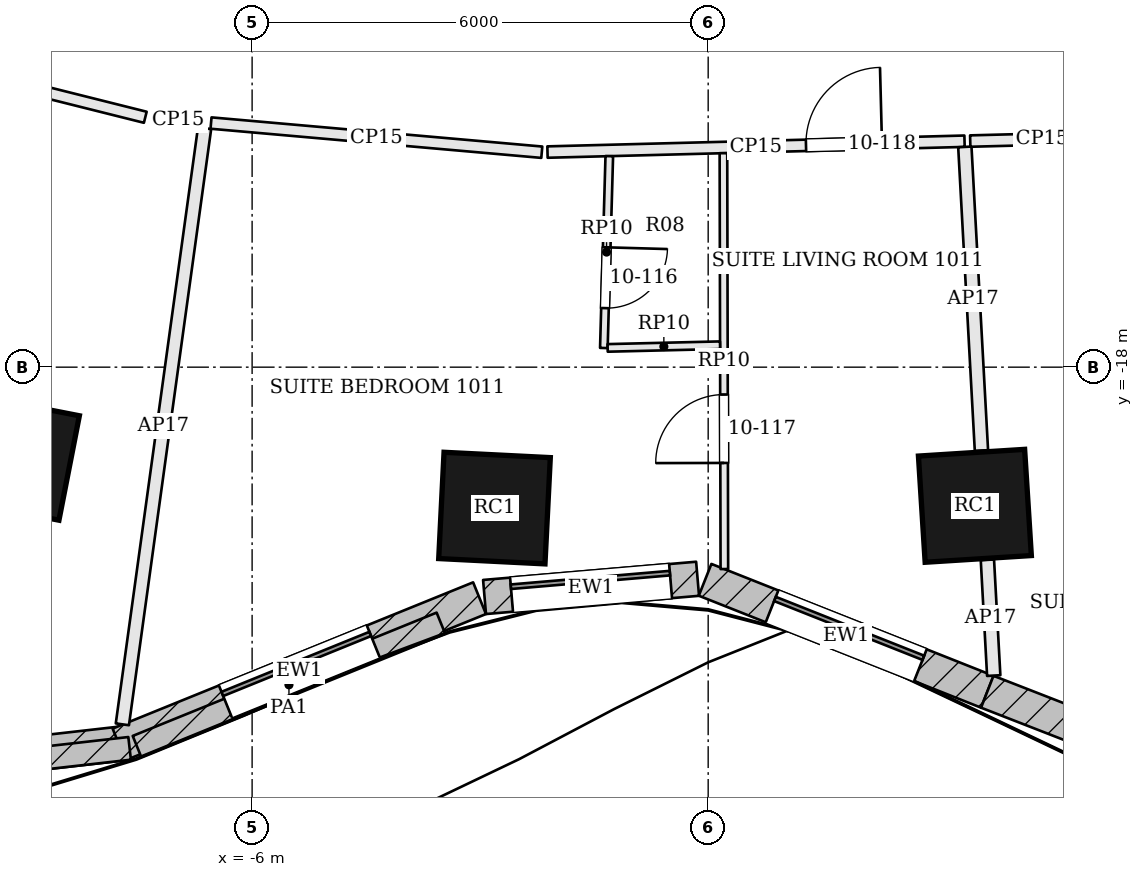
"""IFC4 building model, lengths in metres.
Left out: names, types, materials, properties, quantities, classifications, styles, units other than length and angle.
Written with IfcOpenShell. Run it as: python <this file> out.ifc"""

import sys

from ifc_helpers import new_model, si_unit, direction, frame, frame_2d, origin, origin_2d, place, context, subcontext, project, spatial, rectangle, extrude, element, fill, save


model = new_model("IFC4")
c1 = context("Model", 3, precision=1e-05, world=origin(), true_north=direction((0.0, 1.0)))
c2 = subcontext(c1, "Body", "Model", "MODEL_VIEW")
j1 = project(units=[si_unit("LENGTHUNIT", "METRE"), si_unit("PLANEANGLEUNIT", "RADIAN")], contexts=[c1])
p1 = place(None, origin())
s1 = spatial("IfcSite", under=j1, at=p1, CompositionType="ELEMENT")
p2 = place(p1, origin())
s2 = spatial("IfcBuilding", under=s1, at=p2, CompositionType="ELEMENT")
p3 = place(p2, frame((0.0, 0.0, 51.9)))
s3 = spatial("IfcBuildingStorey", under=s2, at=p3, CompositionType="ELEMENT", Elevation=51.9)
for number, where, z_axis, x_axis in (
    (1, (-9.094, -19.192, 0.0), (0.0, 0.0, 1.0), (0.981, -0.192, 0.0)),
    (2, (-2.811, -19.854, 0.0), (0.0, 0.0, 1.0), (0.999, -0.05, 0.0)),
    (3, (3.509, -19.824, 0.0), (0.0, 0.0, 1.0), (0.998, 0.063, 0.0)),
):
    element("IfcColumn", number, at=place(p3, frame(where, z_axis=z_axis, x_axis=x_axis)), inside=s3, PredefinedType="COLUMN", context=c2, shape_type="SweptSolid", body=[
        extrude(rectangle(XDim=1.4, YDim=1.4, at=origin_2d()), origin(), (0.0, 0.0, 1.0), 3.6),
    ])
p4 = place(p3, frame((-12.086, -23.448, 0.0), z_axis=(0.0, 0.0, 1.0), x_axis=(0.993615664665, 0.112818043472, 0.0)))
e4 = element("IfcWall", 4, at=p4, inside=s3, PredefinedType="SOLIDWALL", context=c2, shape_type="SweptSolid", body=[
    extrude(rectangle(XDim=4.423, YDim=0.45, at=frame_2d((2.212, 0.0))), origin(), (0.0, 0.0, 1.0), 3.4),
])
p5 = place(p4, frame((1.162, 0.0, 0.9)))
e5 = element("IfcOpeningElement", 5, at=p5, cuts=e4, PredefinedType="OPENING", context=c2, shape_type="SweptSolid", body=[
    extrude(rectangle(XDim=2.1, YDim=2.0, at=frame_2d((1.05, 1.0))), frame((0.0, 0.235, 0.0), z_axis=(0.0, -1.0, 0.0), x_axis=(1.0, 0.0, 0.0)), (0.0, 0.0, 1.0), 0.47),
])
p6 = place(p3, frame((-7.75, -22.964, 0.0), z_axis=(0.0, 0.0, 1.0), x_axis=(0.926629703254, 0.375975255897, 0.0)))
e6 = element("IfcWall", 6, at=p6, inside=s3, PredefinedType="SOLIDWALL", context=c2, shape_type="SweptSolid", body=[
    extrude(rectangle(XDim=5.118, YDim=0.45, at=frame_2d((2.559, 0.0))), origin(), (0.0, 0.0, 1.0), 3.4),
])
p7 = place(p6, frame((1.509, 0.0, 0.9)))
e7 = element("IfcOpeningElement", 7, at=p7, cuts=e6, PredefinedType="OPENING", context=c2, shape_type="SweptSolid", body=[
    extrude(rectangle(XDim=2.1, YDim=2.0, at=frame_2d((1.05, 1.0))), frame((0.0, 0.235, 0.0), z_axis=(0.0, -1.0, 0.0), x_axis=(1.0, 0.0, 0.0)), (0.0, 0.0, 1.0), 0.47),
])
p8 = place(p3, frame((-2.942, -21.024, 0.0), z_axis=(0.0, 0.0, 1.0), x_axis=(0.996362034459, 0.085221454389, 0.0)))
e8 = element("IfcWall", 8, at=p8, inside=s3, PredefinedType="SOLIDWALL", context=c2, shape_type="SweptSolid", body=[
    extrude(rectangle(XDim=2.813, YDim=0.45, at=frame_2d((1.407, 0.0))), origin(), (0.0, 0.0, 1.0), 3.4),
])
p9 = place(p8, frame((0.357, 0.0, 0.9)))
e9 = element("IfcOpeningElement", 9, at=p9, cuts=e8, PredefinedType="OPENING", context=c2, shape_type="SweptSolid", body=[
    extrude(rectangle(XDim=2.1, YDim=2.0, at=frame_2d((1.05, 1.0))), frame((0.0, 0.235, 0.0), z_axis=(0.0, -1.0, 0.0), x_axis=(1.0, 0.0, 0.0)), (0.0, 0.0, 1.0), 0.47),
])
p10 = place(p3, frame((-0.041, -20.798, 0.0), z_axis=(0.0, 0.0, 1.0), x_axis=(0.929539262027, -0.368723148649, 0.0)))
e10 = element("IfcWall", 10, at=p10, inside=s3, PredefinedType="SOLIDWALL", context=c2, shape_type="SweptSolid", body=[
    extrude(rectangle(XDim=3.995, YDim=0.45, at=frame_2d((1.997, 0.0))), origin(), (0.0, 0.0, 1.0), 3.4),
])
p11 = place(p10, frame((0.947, 0.0, 0.9)))
e11 = element("IfcOpeningElement", 11, at=p11, cuts=e10, PredefinedType="OPENING", context=c2, shape_type="SweptSolid", body=[
    extrude(rectangle(XDim=2.1, YDim=2.0, at=frame_2d((1.05, 1.0))), frame((0.0, 0.235, 0.0), z_axis=(0.0, -1.0, 0.0), x_axis=(1.0, 0.0, 0.0)), (0.0, 0.0, 1.0), 0.47),
])
p12 = place(p3, frame((3.672, -22.27, 0.0), z_axis=(0.0, 0.0, 1.0), x_axis=(0.931791503167, -0.36299393194, 0.0)))
e12 = element("IfcWall", 12, at=p12, inside=s3, PredefinedType="SOLIDWALL", context=c2, shape_type="SweptSolid", body=[
    extrude(rectangle(XDim=4.56, YDim=0.45, at=frame_2d((2.28, 0.0))), origin(), (0.0, 0.0, 1.0), 3.4),
])
p13 = place(p12, frame((1.23, 0.0, 0.9)))
e13 = element("IfcOpeningElement", 13, at=p13, cuts=e12, PredefinedType="OPENING", context=c2, shape_type="SweptSolid", body=[
    extrude(rectangle(XDim=2.1, YDim=2.0, at=frame_2d((1.05, 1.0))), frame((0.0, 0.235, 0.0), z_axis=(0.0, -1.0, 0.0), x_axis=(1.0, 0.0, 0.0)), (0.0, 0.0, 1.0), 0.47),
])
p14 = place(p3, frame((-11.945, -23.507, 3.6), z_axis=(0.0, 0.0, 1.0), x_axis=(0.993618806168, 0.11279037206, 0.0)))
e14 = element("IfcWall", 14, at=p14, inside=s3, PredefinedType="PARAPET", context=c2, shape_type="SweptSolid", body=[
    extrude(rectangle(XDim=4.362, YDim=0.3, at=frame_2d((2.181, 0.0))), origin(), (0.0, 0.0, 1.0), 1.1),
])
p15 = place(p3, frame((-7.514, -22.99, 3.6), z_axis=(0.0, 0.0, 1.0), x_axis=(0.926627413994, 0.375980897966, 0.0)))
e15 = element("IfcWall", 15, at=p15, inside=s3, PredefinedType="PARAPET", context=c2, shape_type="SweptSolid", body=[
    extrude(rectangle(XDim=4.315, YDim=0.3, at=frame_2d((2.157, 0.0))), origin(), (0.0, 0.0, 1.0), 1.1),
])
p16 = place(p3, frame((-12.371, -13.468, 0.0), z_axis=(0.0, 0.0, 1.0), x_axis=(0.969987994087, -0.243152814764, 0.0)))
e16 = element("IfcWall", 16, at=p16, inside=s3, PredefinedType="PARTITIONING", context=c2, shape_type="SweptSolid", body=[
    extrude(rectangle(XDim=5.119, YDim=0.15, at=frame_2d((2.559, 0.0))), origin(), (0.0, 0.0, 1.0), 2.68),
])
p17 = place(p16, frame((1.067, 0.0, 0.0)))
e17 = element("IfcOpeningElement", 17, at=p17, cuts=e16, PredefinedType="OPENING", context=c2, shape_type="SweptSolid", body=[
    extrude(rectangle(XDim=1.0, YDim=2.1, at=frame_2d((0.5, 1.05))), frame((0.0, 0.085, 0.0), z_axis=(0.0, -1.0, 0.0), x_axis=(1.0, 0.0, 0.0)), (0.0, 0.0, 1.0), 0.17),
])
p18 = place(p3, frame((-7.331, -14.719, 0.0), z_axis=(0.0, 0.0, 1.0), x_axis=(0.996148207285, -0.087685512617, 0.0)))
e18 = element("IfcWall", 18, at=p18, inside=s3, PredefinedType="PARTITIONING", context=c2, shape_type="SweptSolid", body=[
    extrude(rectangle(XDim=0.718, YDim=0.15, at=frame_2d((0.359, 0.0))), origin(), (0.0, 0.0, 1.0), 2.68),
])
p19 = place(p3, frame((-7.707, -22.699, 0.0), z_axis=(0.0, 0.0, 1.0), x_axis=(0.13661443917, 0.990624295589, 0.0)))
e19 = element("IfcWall", 19, at=p19, inside=s3, PredefinedType="PARTITIONING", context=c2, shape_type="SweptSolid", body=[
    extrude(rectangle(XDim=7.917, YDim=0.175, at=frame_2d((3.958, 0.0))), origin(), (0.0, 0.0, 1.0), 2.68),
])
p20 = place(p3, frame((-6.541, -14.789, 0.0), z_axis=(0.0, 0.0, 1.0), x_axis=(0.996138192674, -0.087799208971, 0.0)))
e20 = element("IfcWall", 20, at=p20, inside=s3, PredefinedType="PARTITIONING", context=c2, shape_type="SweptSolid", body=[
    extrude(rectangle(XDim=4.368, YDim=0.15, at=frame_2d((2.184, 0.0))), origin(), (0.0, 0.0, 1.0), 2.68),
])
p21 = place(p3, frame((-2.114, -15.17, 0.0), z_axis=(0.0, 0.0, 1.0), x_axis=(0.999662545619, 0.025976814392, 0.0)))
e21 = element("IfcWall", 21, at=p21, inside=s3, PredefinedType="PARTITIONING", context=c2, shape_type="SweptSolid", body=[
    extrude(rectangle(XDim=5.489, YDim=0.15, at=frame_2d((2.744, 0.0))), origin(), (0.0, 0.0, 1.0), 2.68),
])
p22 = place(p21, frame((3.402, 0.0, 0.0)))
e22 = element("IfcOpeningElement", 22, at=p22, cuts=e21, PredefinedType="OPENING", context=c2, shape_type="SweptSolid", body=[
    extrude(rectangle(XDim=1.0, YDim=2.1, at=frame_2d((0.5, 1.05))), frame((0.0, 0.085, 0.0), z_axis=(0.0, -1.0, 0.0), x_axis=(1.0, 0.0, 0.0)), (0.0, 0.0, 1.0), 0.17),
])
p23 = place(p3, frame((3.757, -22.058, 0.0), z_axis=(0.0, 0.0, 1.0), x_axis=(-0.054592188309, 0.998508734552, 0.0)))
e23 = element("IfcWall", 23, at=p23, inside=s3, PredefinedType="PARTITIONING", context=c2, shape_type="SweptSolid", body=[
    extrude(rectangle(XDim=1.525, YDim=0.175, at=frame_2d((0.762, 0.0))), origin(), (0.0, 0.0, 1.0), 2.68),
])
p24 = place(p3, frame((3.595, -19.097, 0.0), z_axis=(0.0, 0.0, 1.0), x_axis=(-0.054614936385, 0.99850749057, 0.0)))
e24 = element("IfcWall", 24, at=p24, inside=s3, PredefinedType="PARTITIONING", context=c2, shape_type="SweptSolid", body=[
    extrude(rectangle(XDim=4.001, YDim=0.175, at=frame_2d((2.0, 0.0))), origin(), (0.0, 0.0, 1.0), 2.68),
])
p25 = place(p3, frame((3.448, -15.025, 0.0), z_axis=(0.0, 0.0, 1.0), x_axis=(0.999663410965, 0.025943492008, 0.0)))
e25 = element("IfcWall", 25, at=p25, inside=s3, PredefinedType="PARTITIONING", context=c2, shape_type="SweptSolid", body=[
    extrude(rectangle(XDim=1.892, YDim=0.15, at=frame_2d((0.946, 0.0))), origin(), (0.0, 0.0, 1.0), 2.68),
])
p26 = place(p3, frame((0.213, -20.656, 0.0), z_axis=(0.0, 0.0, 1.0), x_axis=(-0.00223124082, 0.999997510779, 0.0)))
e26 = element("IfcWall", 26, at=p26, inside=s3, PredefinedType="PARTITIONING", context=c2, shape_type="SweptSolid", body=[
    extrude(rectangle(XDim=5.471, YDim=0.1, at=frame_2d((2.735, 0.0))), origin(), (0.0, 0.0, 1.0), 2.898),
])
p27 = place(p26, frame((1.396, 0.0, 0.0)))
e27 = element("IfcOpeningElement", 27, at=p27, cuts=e26, PredefinedType="OPENING", context=c2, shape_type="SweptSolid", body=[
    extrude(rectangle(XDim=0.9, YDim=2.4, at=frame_2d((0.45, 1.2))), frame((0.0, 0.06, 0.0), z_axis=(0.0, -1.0, 0.0), x_axis=(1.0, 0.0, 0.0)), (0.0, 0.0, 1.0), 0.12),
])
p28 = place(p3, frame((-1.301, -15.224, 0.0), z_axis=(0.0, 0.0, 1.0), x_axis=(-0.028333401265, -0.999598528597, 0.0)))
e28 = element("IfcWall", 28, at=p28, inside=s3, PredefinedType="PARTITIONING", context=c2, shape_type="SweptSolid", body=[
    extrude(rectangle(XDim=2.525, YDim=0.1, at=frame_2d((1.262, 0.0))), origin(), (0.0, 0.0, 1.0), 2.898),
])
p29 = place(p28, frame((1.2, 0.0, 0.0)))
e29 = element("IfcOpeningElement", 29, at=p29, cuts=e28, PredefinedType="OPENING", context=c2, shape_type="SweptSolid", body=[
    extrude(rectangle(XDim=0.8, YDim=2.1, at=frame_2d((0.4, 1.05))), frame((0.0, 0.06, 0.0), z_axis=(0.0, -1.0, 0.0), x_axis=(1.0, 0.0, 0.0)), (0.0, 0.0, 1.0), 0.12),
])
p30 = place(p3, frame((-1.323, -17.747, 0.0), z_axis=(0.0, 0.0, 1.0), x_axis=(0.999713673915, 0.023928438877, 0.0)))
e30 = element("IfcWall", 30, at=p30, inside=s3, PredefinedType="PARTITIONING", context=c2, shape_type="SweptSolid", body=[
    extrude(rectangle(XDim=1.479, YDim=0.1, at=frame_2d((0.74, 0.0))), origin(), (0.0, 0.0, 1.0), 2.898),
])
p31 = place(p7, origin())
e31 = element("IfcWindow", 31, at=p31, inside=s3, PartitioningType="SINGLE_PANEL", PredefinedType="WINDOW", context=c2, shape_type="SweptSolid", body=[
    extrude(rectangle(XDim=2.1, YDim=2.0, at=frame_2d((1.05, 1.0))), frame((0.0, 0.135, 0.0), z_axis=(0.0, -1.0, 0.0), x_axis=(1.0, 0.0, 0.0)), (0.0, 0.0, 1.0), 0.06),
])
fill(e7, e31)
p32 = place(p9, origin())
e32 = element("IfcWindow", 32, at=p32, inside=s3, PartitioningType="SINGLE_PANEL", PredefinedType="WINDOW", context=c2, shape_type="SweptSolid", body=[
    extrude(rectangle(XDim=2.1, YDim=2.0, at=frame_2d((1.05, 1.0))), frame((0.0, 0.135, 0.0), z_axis=(0.0, -1.0, 0.0), x_axis=(1.0, 0.0, 0.0)), (0.0, 0.0, 1.0), 0.06),
])
fill(e9, e32)
p33 = place(p11, origin())
e33 = element("IfcWindow", 33, at=p33, inside=s3, PartitioningType="SINGLE_PANEL", PredefinedType="WINDOW", context=c2, shape_type="SweptSolid", body=[
    extrude(rectangle(XDim=2.1, YDim=2.0, at=frame_2d((1.05, 1.0))), frame((0.0, 0.135, 0.0), z_axis=(0.0, -1.0, 0.0), x_axis=(1.0, 0.0, 0.0)), (0.0, 0.0, 1.0), 0.06),
])
fill(e11, e33)
p34 = place(p29, origin())
e34 = element("IfcDoor", 34, at=p34, inside=s3, OperationType="SINGLE_SWING_LEFT", PredefinedType="DOOR", context=c2, shape_type="SweptSolid", body=[
    extrude(rectangle(XDim=0.8, YDim=2.1, at=frame_2d((0.4, 1.05))), frame((0.0, 0.025, 0.0), z_axis=(0.0, -1.0, 0.0), x_axis=(1.0, 0.0, 0.0)), (0.0, 0.0, 1.0), 0.05),
])
fill(e29, e34)
p35 = place(p27, origin())
e35 = element("IfcDoor", 35, at=p35, inside=s3, OperationType="SINGLE_SWING_LEFT", PredefinedType="DOOR", context=c2, shape_type="SweptSolid", body=[
    extrude(rectangle(XDim=0.9, YDim=2.4, at=frame_2d((0.45, 1.2))), frame((0.0, 0.025, 0.0), z_axis=(0.0, -1.0, 0.0), x_axis=(1.0, 0.0, 0.0)), (0.0, 0.0, 1.0), 0.05),
])
fill(e27, e35)
p36 = place(p22, origin())
e36 = element("IfcDoor", 36, at=p36, inside=s3, OperationType="SINGLE_SWING_RIGHT", PredefinedType="DOOR", context=c2, shape_type="SweptSolid", body=[
    extrude(rectangle(XDim=1.0, YDim=2.1, at=frame_2d((0.5, 1.05))), frame((0.0, 0.025, 0.0), z_axis=(0.0, -1.0, 0.0), x_axis=(1.0, 0.0, 0.0)), (0.0, 0.0, 1.0), 0.05),
])
fill(e22, e36)
save(model, sys.argv[1])
